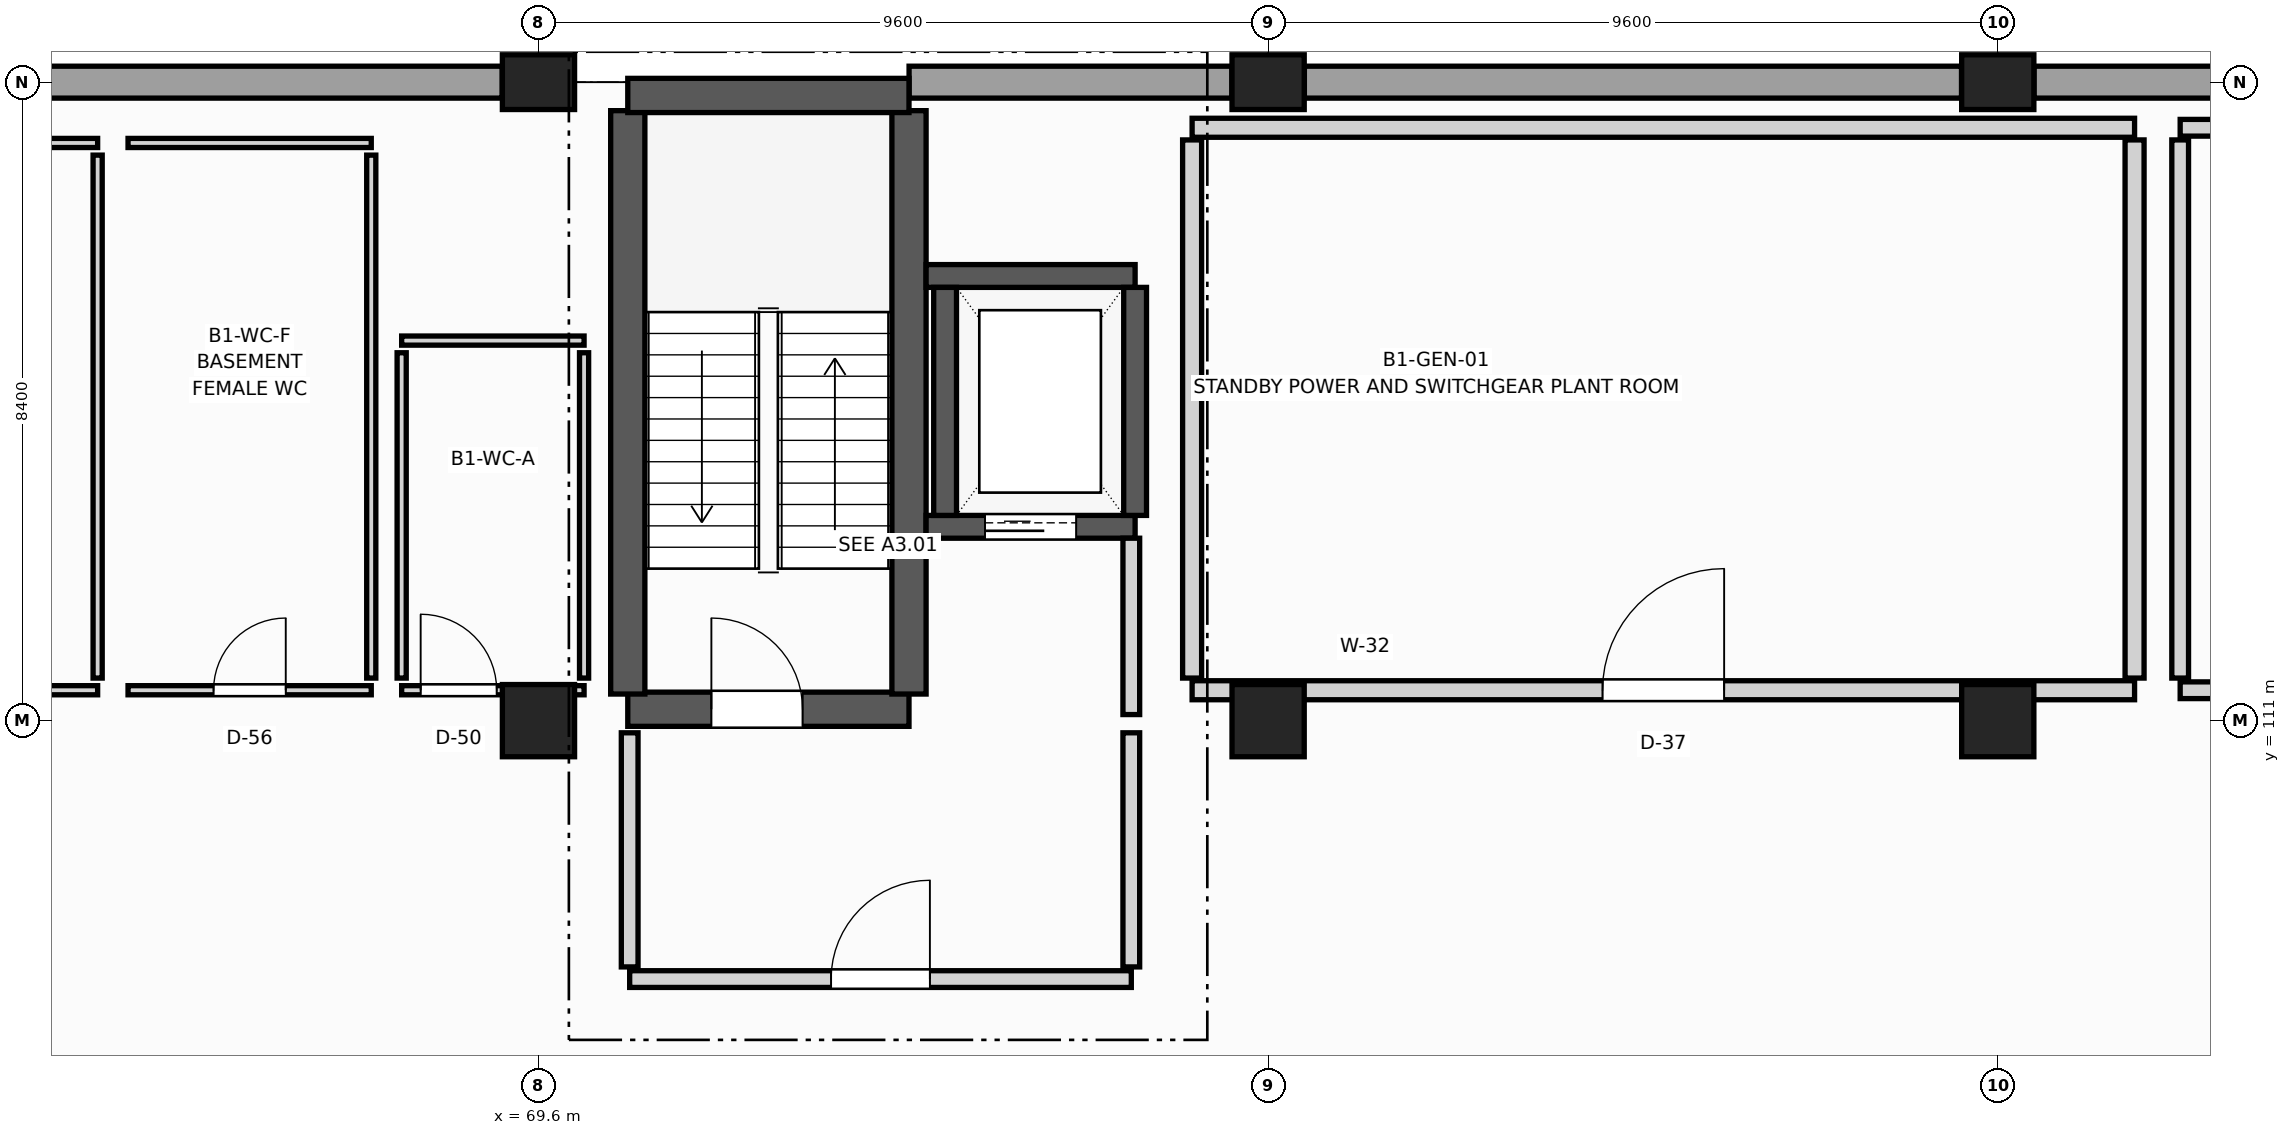
"""IFC4 building model, lengths in metres.
Left out: names, types, materials, properties, quantities, classifications, styles, units other than length and angle.
Written with IfcOpenShell. Run it as: python <this file> out.ifc"""

import sys

from ifc_helpers import new_model, si_unit, direction, frame, frame_2d, origin, origin_2d, place, context, subcontext, project, spatial, rectangle, extrude, element, fill, save


model = new_model("IFC4")
c1 = context("Model", 3, precision=1e-05, world=origin(), true_north=direction((0.0, 1.0)))
c2 = subcontext(c1, "Body", "Model", "MODEL_VIEW")
j1 = project(units=[si_unit("LENGTHUNIT", "METRE"), si_unit("PLANEANGLEUNIT", "RADIAN")], contexts=[c1])
p1 = place(None, origin())
s1 = spatial("IfcSite", under=j1, at=p1, CompositionType="ELEMENT")
p2 = place(p1, origin())
s2 = spatial("IfcBuilding", under=s1, at=p2, CompositionType="ELEMENT")
p3 = place(p2, frame((0.0, 0.0, -4.5)))
s3 = spatial("IfcBuildingStorey", under=s2, at=p3, CompositionType="ELEMENT", Elevation=-4.5)
p4 = place(p3, frame((69.6, 111.0, 0.0), z_axis=(0.0, 0.0, 1.0), x_axis=(1.0, 0.0, 0.0)))
e1 = element("IfcColumn", 1, at=p4, inside=s3, PredefinedType="COLUMN", context=c2, shape_type="SweptSolid", body=[
    extrude(rectangle(XDim=0.95, YDim=0.95, at=origin_2d()), origin(), (0.0, 0.0, 1.0), 4.14),
])
p5 = place(p3, frame((69.6, 119.4, 0.0), z_axis=(0.0, 0.0, 1.0), x_axis=(1.0, 0.0, 0.0)))
e2 = element("IfcColumn", 2, at=p5, inside=s3, PredefinedType="COLUMN", context=c2, shape_type="SweptSolid", body=[
    extrude(rectangle(XDim=0.95, YDim=0.72, at=origin_2d()), origin(), (0.0, 0.0, 1.0), 4.14),
])
p6 = place(p3, frame((79.2, 111.0, 0.0), z_axis=(0.0, 0.0, 1.0), x_axis=(1.0, 0.0, 0.0)))
e3 = element("IfcColumn", 3, at=p6, inside=s3, PredefinedType="COLUMN", context=c2, shape_type="SweptSolid", body=[
    extrude(rectangle(XDim=0.95, YDim=0.95, at=origin_2d()), origin(), (0.0, 0.0, 1.0), 4.14),
])
p7 = place(p3, frame((79.2, 119.4, 0.0), z_axis=(0.0, 0.0, 1.0), x_axis=(1.0, 0.0, 0.0)))
e4 = element("IfcColumn", 4, at=p7, inside=s3, PredefinedType="COLUMN", context=c2, shape_type="SweptSolid", body=[
    extrude(rectangle(XDim=0.95, YDim=0.72, at=origin_2d()), origin(), (0.0, 0.0, 1.0), 4.14),
])
p8 = place(p3, frame((88.8, 111.0, 0.0), z_axis=(0.0, 0.0, 1.0), x_axis=(1.0, 0.0, 0.0)))
e5 = element("IfcColumn", 5, at=p8, inside=s3, PredefinedType="COLUMN", context=c2, shape_type="SweptSolid", body=[
    extrude(rectangle(XDim=0.95, YDim=0.95, at=origin_2d()), origin(), (0.0, 0.0, 1.0), 4.14),
])
p9 = place(p3, frame((88.8, 119.4, 0.0), z_axis=(0.0, 0.0, 1.0), x_axis=(1.0, 0.0, 0.0)))
e6 = element("IfcColumn", 6, at=p9, inside=s3, PredefinedType="COLUMN", context=c2, shape_type="SweptSolid", body=[
    extrude(rectangle(XDim=0.95, YDim=0.72, at=origin_2d()), origin(), (0.0, 0.0, 1.0), 4.14),
])
p10 = place(p3, frame((60.477, 119.4, 0.0), z_axis=(0.0, 0.0, 1.0), x_axis=(1.0, 0.0, 0.0)))
e7 = element("IfcWall", 7, at=p10, inside=s3, PredefinedType="SOLIDWALL", context=c2, shape_type="SweptSolid", body=[
    extrude(rectangle(XDim=8.646, YDim=0.42, at=frame_2d((4.323, 0.0))), origin(), (0.0, 0.0, 1.0), 4.135),
])
p11 = place(p3, frame((74.476, 119.4, 0.0), z_axis=(0.0, 0.0, 1.0), x_axis=(1.0, 0.0, 0.0)))
e8 = element("IfcWall", 8, at=p11, inside=s3, PredefinedType="SOLIDWALL", context=c2, shape_type="SweptSolid", body=[
    extrude(rectangle(XDim=4.247, YDim=0.42, at=frame_2d((2.124, 0.0))), origin(), (0.0, 0.0, 1.0), 4.135),
])
for number, where, z_axis, x_axis in (
    (9, (79.677, 119.4, 0.0), (0.0, 0.0, 1.0), (1.0, 0.0, 0.0)),
    (10, (89.277, 119.4, 0.0), (0.0, 0.0, 1.0), (1.0, 0.0, 0.0)),
):
    element("IfcWall", number, at=place(p3, frame(where, z_axis=z_axis, x_axis=x_axis)), inside=s3, PredefinedType="SOLIDWALL", context=c2, shape_type="SweptSolid", body=[
        extrude(rectangle(XDim=8.646, YDim=0.42, at=frame_2d((4.323, 0.0))), origin(), (0.0, 0.0, 1.0), 4.135),
    ])
p12 = place(p3, frame((70.775, 111.15, 0.0), z_axis=(0.0, 0.0, 1.0), x_axis=(1.0, 0.0, 0.0)))
e11 = element("IfcWall", 11, at=p12, inside=s3, PredefinedType="SHEAR", context=c2, shape_type="SweptSolid", body=[
    extrude(rectangle(XDim=3.7, YDim=0.45, at=frame_2d((1.85, 0.0))), origin(), (0.0, 0.0, 1.0), 4.14),
])
p13 = place(p12, frame((1.1, 0.0, 0.0)))
e12 = element("IfcOpeningElement", 12, at=p13, cuts=e11, PredefinedType="OPENING", context=c2, shape_type="SweptSolid", body=[
    extrude(rectangle(XDim=1.2, YDim=2.2, at=frame_2d((0.6, 1.1))), frame((0.0, 0.235, 0.0), z_axis=(0.0, -1.0, 0.0), x_axis=(1.0, 0.0, 0.0)), (0.0, 0.0, 1.0), 0.47),
])
for number, where, z_axis, x_axis in (
    (13, (70.775, 111.35, 0.0), (0.0, 0.0, 1.0), (0.0, 1.0, 0.0)),
    (14, (74.475, 111.35, 0.0), (0.0, 0.0, 1.0), (0.0, 1.0, 0.0)),
):
    element("IfcWall", number, at=place(p3, frame(where, z_axis=z_axis, x_axis=x_axis)), inside=s3, PredefinedType="SHEAR", context=c2, shape_type="SweptSolid", body=[
        extrude(rectangle(XDim=7.675, YDim=0.45, at=frame_2d((3.837, 0.0))), origin(), (0.0, 0.0, 1.0), 4.14),
    ])
p14 = place(p3, frame((70.775, 119.225, 0.0), z_axis=(0.0, 0.0, 1.0), x_axis=(1.0, 0.0, 0.0)))
e15 = element("IfcWall", 15, at=p14, inside=s3, PredefinedType="SHEAR", context=c2, shape_type="SweptSolid", body=[
    extrude(rectangle(XDim=3.7, YDim=0.45, at=frame_2d((1.85, 0.0))), origin(), (0.0, 0.0, 1.0), 4.14),
])
p15 = place(p3, frame((74.7, 113.55, 0.0), z_axis=(0.0, 0.0, 1.0), x_axis=(1.0, 0.0, 0.0)))
e16 = element("IfcWall", 16, at=p15, inside=s3, PredefinedType="SHEAR", context=c2, shape_type="SweptSolid", body=[
    extrude(rectangle(XDim=2.75, YDim=0.3, at=frame_2d((1.375, 0.0))), origin(), (0.0, 0.0, 1.0), 4.14),
])
p16 = place(p15, frame((0.775, 0.0, 0.0)))
e17 = element("IfcOpeningElement", 17, at=p16, cuts=e16, PredefinedType="OPENING", context=c2, shape_type="SweptSolid", body=[
    extrude(rectangle(XDim=1.2, YDim=2.2, at=frame_2d((0.6, 1.1))), frame((0.0, 0.16, 0.0), z_axis=(0.0, -1.0, 0.0), x_axis=(1.0, 0.0, 0.0)), (0.0, 0.0, 1.0), 0.32),
])
p17 = place(p3, frame((74.7, 116.85, 0.0), z_axis=(0.0, 0.0, 1.0), x_axis=(1.0, 0.0, 0.0)))
e18 = element("IfcWall", 18, at=p17, inside=s3, PredefinedType="SHEAR", context=c2, shape_type="SweptSolid", body=[
    extrude(rectangle(XDim=2.75, YDim=0.3, at=frame_2d((1.375, 0.0))), origin(), (0.0, 0.0, 1.0), 4.14),
])
for number, where, z_axis, x_axis in (
    (19, (74.95, 113.7, 0.0), (0.0, 0.0, 1.0), (0.0, 1.0, 0.0)),
    (20, (77.45, 113.7, 0.0), (0.0, 0.0, 1.0), (0.0, 1.0, 0.0)),
):
    element("IfcWall", number, at=place(p3, frame(where, z_axis=z_axis, x_axis=x_axis)), inside=s3, PredefinedType="SHEAR", context=c2, shape_type="SweptSolid", body=[
        extrude(rectangle(XDim=3.0, YDim=0.3, at=frame_2d((1.5, 0.0))), origin(), (0.0, 0.0, 1.0), 4.14),
    ])
p18 = place(p3, frame((70.8, 107.6, 0.0), z_axis=(0.0, 0.0, 1.0), x_axis=(1.0, 0.0, 0.0)))
e21 = element("IfcWall", 21, at=p18, inside=s3, PredefinedType="PARTITIONING", context=c2, shape_type="SweptSolid", body=[
    extrude(rectangle(XDim=6.6, YDim=0.22, at=frame_2d((3.3, 0.0))), origin(), (0.0, 0.0, 1.0), 3.22),
])
p19 = place(p18, frame((2.65, 0.0, 0.0)))
e22 = element("IfcOpeningElement", 22, at=p19, cuts=e21, PredefinedType="OPENING", context=c2, shape_type="SweptSolid", body=[
    extrude(rectangle(XDim=1.3, YDim=2.2, at=frame_2d((0.65, 1.1))), frame((0.0, 0.12, 0.0), z_axis=(0.0, -1.0, 0.0), x_axis=(1.0, 0.0, 0.0)), (0.0, 0.0, 1.0), 0.24),
])
p20 = place(p3, frame((77.4, 111.08, 0.0), z_axis=(0.0, 0.0, 1.0), x_axis=(0.0, 1.0, 0.0)))
e23 = element("IfcWall", 23, at=p20, inside=s3, PredefinedType="PARTITIONING", context=c2, shape_type="SweptSolid", body=[
    extrude(rectangle(XDim=2.32, YDim=0.22, at=frame_2d((1.16, 0.0))), origin(), (0.0, 0.0, 1.0), 3.22),
])
for number, where, z_axis, x_axis in (
    (24, (70.8, 107.76, 0.0), (0.0, 0.0, 1.0), (0.0, 1.0, 0.0)),
    (25, (77.4, 107.76, 0.0), (0.0, 0.0, 1.0), (0.0, 1.0, 0.0)),
):
    element("IfcWall", number, at=place(p3, frame(where, z_axis=z_axis, x_axis=x_axis)), inside=s3, PredefinedType="PARTITIONING", context=c2, shape_type="SweptSolid", body=[
        extrude(rectangle(XDim=3.08, YDim=0.22, at=frame_2d((1.54, 0.0))), origin(), (0.0, 0.0, 1.0), 3.22),
    ])
p21 = place(p3, frame((78.2, 111.4, 0.0), z_axis=(0.0, 0.0, 1.0), x_axis=(1.0, 0.0, 0.0)))
e26 = element("IfcWall", 26, at=p21, inside=s3, PredefinedType="PARTITIONING", context=c2, shape_type="SweptSolid", body=[
    extrude(rectangle(XDim=12.4, YDim=0.25, at=frame_2d((6.2, 0.0))), origin(), (0.0, 0.0, 1.0), 3.22),
])
p22 = place(p21, frame((5.4, 0.0, 0.0)))
e27 = element("IfcOpeningElement", 27, at=p22, cuts=e26, PredefinedType="OPENING", context=c2, shape_type="SweptSolid", body=[
    extrude(rectangle(XDim=1.6, YDim=2.3, at=frame_2d((0.8, 1.15))), frame((0.0, 0.135, 0.0), z_axis=(0.0, -1.0, 0.0), x_axis=(1.0, 0.0, 0.0)), (0.0, 0.0, 1.0), 0.27),
])
p23 = place(p3, frame((78.2, 118.8, 0.0), z_axis=(0.0, 0.0, 1.0), x_axis=(1.0, 0.0, 0.0)))
e28 = element("IfcWall", 28, at=p23, inside=s3, PredefinedType="PARTITIONING", context=c2, shape_type="SweptSolid", body=[
    extrude(rectangle(XDim=12.4, YDim=0.25, at=frame_2d((6.2, 0.0))), origin(), (0.0, 0.0, 1.0), 3.22),
])
for number, where, z_axis, x_axis in (
    (29, (78.2, 111.56, 0.0), (0.0, 0.0, 1.0), (0.0, 1.0, 0.0)),
    (30, (90.6, 111.56, 0.0), (0.0, 0.0, 1.0), (0.0, 1.0, 0.0)),
):
    element("IfcWall", number, at=place(p3, frame(where, z_axis=z_axis, x_axis=x_axis)), inside=s3, PredefinedType="PARTITIONING", context=c2, shape_type="SweptSolid", body=[
        extrude(rectangle(XDim=7.08, YDim=0.25, at=frame_2d((3.54, 0.0))), origin(), (0.0, 0.0, 1.0), 3.22),
    ])
p24 = place(p3, frame((91.2, 111.4, 0.0), z_axis=(0.0, 0.0, 1.0), x_axis=(1.0, 0.0, 0.0)))
e31 = element("IfcWall", 31, at=p24, inside=s3, PredefinedType="PARTITIONING", context=c2, shape_type="SweptSolid", body=[
    extrude(rectangle(XDim=8.4, YDim=0.22, at=frame_2d((4.2, 0.0))), origin(), (0.0, 0.0, 1.0), 3.22),
])
p25 = place(p24, frame((3.4, 0.0, 0.0)))
e32 = element("IfcOpeningElement", 32, at=p25, cuts=e31, PredefinedType="OPENING", context=c2, shape_type="SweptSolid", body=[
    extrude(rectangle(XDim=1.6, YDim=2.3, at=frame_2d((0.8, 1.15))), frame((0.0, 0.12, 0.0), z_axis=(0.0, -1.0, 0.0), x_axis=(1.0, 0.0, 0.0)), (0.0, 0.0, 1.0), 0.24),
])
p26 = place(p3, frame((91.2, 118.8, 0.0), z_axis=(0.0, 0.0, 1.0), x_axis=(1.0, 0.0, 0.0)))
e33 = element("IfcWall", 33, at=p26, inside=s3, PredefinedType="PARTITIONING", context=c2, shape_type="SweptSolid", body=[
    extrude(rectangle(XDim=8.4, YDim=0.22, at=frame_2d((4.2, 0.0))), origin(), (0.0, 0.0, 1.0), 3.22),
])
p27 = place(p3, frame((91.2, 111.56, 0.0), z_axis=(0.0, 0.0, 1.0), x_axis=(0.0, 1.0, 0.0)))
e34 = element("IfcWall", 34, at=p27, inside=s3, PredefinedType="PARTITIONING", context=c2, shape_type="SweptSolid", body=[
    extrude(rectangle(XDim=7.08, YDim=0.22, at=frame_2d((3.54, 0.0))), origin(), (0.0, 0.0, 1.0), 3.22),
])
p28 = place(p3, frame((60.4, 111.4, 0.0), z_axis=(0.0, 0.0, 1.0), x_axis=(1.0, 0.0, 0.0)))
e35 = element("IfcWall", 35, at=p28, inside=s3, PredefinedType="PARTITIONING", context=c2, shape_type="SweptSolid", body=[
    extrude(rectangle(XDim=3.4, YDim=0.12, at=frame_2d((1.7, 0.0))), origin(), (0.0, 0.0, 1.0), 3.22),
])
p29 = place(p28, frame((1.225, 0.0, 0.0)))
e36 = element("IfcOpeningElement", 36, at=p29, cuts=e35, PredefinedType="OPENING", context=c2, shape_type="SweptSolid", body=[
    extrude(rectangle(XDim=0.95, YDim=2.1, at=frame_2d((0.475, 1.05))), frame((0.0, 0.07, 0.0), z_axis=(0.0, -1.0, 0.0), x_axis=(1.0, 0.0, 0.0)), (0.0, 0.0, 1.0), 0.14),
])
p30 = place(p3, frame((60.4, 118.6, 0.0), z_axis=(0.0, 0.0, 1.0), x_axis=(1.0, 0.0, 0.0)))
e37 = element("IfcWall", 37, at=p30, inside=s3, PredefinedType="PARTITIONING", context=c2, shape_type="SweptSolid", body=[
    extrude(rectangle(XDim=3.4, YDim=0.12, at=frame_2d((1.7, 0.0))), origin(), (0.0, 0.0, 1.0), 3.22),
])
p31 = place(p3, frame((63.8, 111.56, 0.0), z_axis=(0.0, 0.0, 1.0), x_axis=(0.0, 1.0, 0.0)))
e38 = element("IfcWall", 38, at=p31, inside=s3, PredefinedType="PARTITIONING", context=c2, shape_type="SweptSolid", body=[
    extrude(rectangle(XDim=6.88, YDim=0.12, at=frame_2d((3.44, 0.0))), origin(), (0.0, 0.0, 1.0), 3.22),
])
p32 = place(p3, frame((64.2, 111.4, 0.0), z_axis=(0.0, 0.0, 1.0), x_axis=(1.0, 0.0, 0.0)))
e39 = element("IfcWall", 39, at=p32, inside=s3, PredefinedType="PARTITIONING", context=c2, shape_type="SweptSolid", body=[
    extrude(rectangle(XDim=3.2, YDim=0.12, at=frame_2d((1.6, 0.0))), origin(), (0.0, 0.0, 1.0), 3.22),
])
p33 = place(p32, frame((1.125, 0.0, 0.0)))
e40 = element("IfcOpeningElement", 40, at=p33, cuts=e39, PredefinedType="OPENING", context=c2, shape_type="SweptSolid", body=[
    extrude(rectangle(XDim=0.95, YDim=2.1, at=frame_2d((0.475, 1.05))), frame((0.0, 0.07, 0.0), z_axis=(0.0, -1.0, 0.0), x_axis=(1.0, 0.0, 0.0)), (0.0, 0.0, 1.0), 0.14),
])
p34 = place(p3, frame((64.2, 118.6, 0.0), z_axis=(0.0, 0.0, 1.0), x_axis=(1.0, 0.0, 0.0)))
e41 = element("IfcWall", 41, at=p34, inside=s3, PredefinedType="PARTITIONING", context=c2, shape_type="SweptSolid", body=[
    extrude(rectangle(XDim=3.2, YDim=0.12, at=frame_2d((1.6, 0.0))), origin(), (0.0, 0.0, 1.0), 3.22),
])
p35 = place(p3, frame((67.4, 111.56, 0.0), z_axis=(0.0, 0.0, 1.0), x_axis=(0.0, 1.0, 0.0)))
e42 = element("IfcWall", 42, at=p35, inside=s3, PredefinedType="PARTITIONING", context=c2, shape_type="SweptSolid", body=[
    extrude(rectangle(XDim=6.88, YDim=0.12, at=frame_2d((3.44, 0.0))), origin(), (0.0, 0.0, 1.0), 3.22),
])
p36 = place(p3, frame((67.8, 111.4, 0.0), z_axis=(0.0, 0.0, 1.0), x_axis=(1.0, 0.0, 0.0)))
e43 = element("IfcWall", 43, at=p36, inside=s3, PredefinedType="PARTITIONING", context=c2, shape_type="SweptSolid", body=[
    extrude(rectangle(XDim=2.4, YDim=0.12, at=frame_2d((1.2, 0.0))), origin(), (0.0, 0.0, 1.0), 3.22),
])
p37 = place(p36, frame((0.25, 0.0, 0.0)))
e44 = element("IfcOpeningElement", 44, at=p37, cuts=e43, PredefinedType="OPENING", context=c2, shape_type="SweptSolid", body=[
    extrude(rectangle(XDim=1.0, YDim=2.15, at=frame_2d((0.5, 1.075))), frame((0.0, 0.07, 0.0), z_axis=(0.0, -1.0, 0.0), x_axis=(1.0, 0.0, 0.0)), (0.0, 0.0, 1.0), 0.14),
])
p38 = place(p3, frame((67.8, 116.0, 0.0), z_axis=(0.0, 0.0, 1.0), x_axis=(1.0, 0.0, 0.0)))
e45 = element("IfcWall", 45, at=p38, inside=s3, PredefinedType="PARTITIONING", context=c2, shape_type="SweptSolid", body=[
    extrude(rectangle(XDim=2.4, YDim=0.12, at=frame_2d((1.2, 0.0))), origin(), (0.0, 0.0, 1.0), 3.22),
])
for number, where, z_axis, x_axis in (
    (46, (67.8, 111.56, 0.0), (0.0, 0.0, 1.0), (0.0, 1.0, 0.0)),
    (47, (70.2, 111.56, 0.0), (0.0, 0.0, 1.0), (0.0, 1.0, 0.0)),
):
    element("IfcWall", number, at=place(p3, frame(where, z_axis=z_axis, x_axis=x_axis)), inside=s3, PredefinedType="PARTITIONING", context=c2, shape_type="SweptSolid", body=[
        extrude(rectangle(XDim=4.28, YDim=0.12, at=frame_2d((2.14, 0.0))), origin(), (0.0, 0.0, 1.0), 3.22),
    ])
p39 = place(p13, origin())
e48 = element("IfcDoor", 48, at=p39, inside=s3, OperationType="SINGLE_SWING_LEFT", PredefinedType="DOOR", context=c2, shape_type="SweptSolid", body=[
    extrude(rectangle(XDim=1.2, YDim=2.2, at=frame_2d((0.6, 1.1))), frame((0.0, 0.025, 0.0), z_axis=(0.0, -1.0, 0.0), x_axis=(1.0, 0.0, 0.0)), (0.0, 0.0, 1.0), 0.05),
])
fill(e12, e48)
p40 = place(p16, origin())
e49 = element("IfcDoor", 49, at=p40, inside=s3, OperationType="SLIDING_TO_LEFT", PredefinedType="DOOR", context=c2, shape_type="SweptSolid", body=[
    extrude(rectangle(XDim=1.2, YDim=2.2, at=frame_2d((0.6, 1.1))), frame((0.0, 0.025, 0.0), z_axis=(0.0, -1.0, 0.0), x_axis=(1.0, 0.0, 0.0)), (0.0, 0.0, 1.0), 0.05),
])
fill(e17, e49)
p41 = place(p19, origin())
e50 = element("IfcDoor", 50, at=p41, inside=s3, OperationType="SINGLE_SWING_RIGHT", PredefinedType="DOOR", context=c2, shape_type="SweptSolid", body=[
    extrude(rectangle(XDim=1.3, YDim=2.2, at=frame_2d((0.65, 1.1))), frame((0.0, 0.025, 0.0), z_axis=(0.0, -1.0, 0.0), x_axis=(1.0, 0.0, 0.0)), (0.0, 0.0, 1.0), 0.05),
])
fill(e22, e50)
p42 = place(p22, origin())
e51 = element("IfcDoor", 51, at=p42, inside=s3, OperationType="SINGLE_SWING_RIGHT", PredefinedType="DOOR", context=c2, shape_type="SweptSolid", body=[
    extrude(rectangle(XDim=1.6, YDim=2.3, at=frame_2d((0.8, 1.15))), frame((0.0, 0.025, 0.0), z_axis=(0.0, -1.0, 0.0), x_axis=(1.0, 0.0, 0.0)), (0.0, 0.0, 1.0), 0.05),
])
fill(e27, e51)
p43 = place(p33, origin())
e52 = element("IfcDoor", 52, at=p43, inside=s3, OperationType="SINGLE_SWING_RIGHT", PredefinedType="DOOR", context=c2, shape_type="SweptSolid", body=[
    extrude(rectangle(XDim=0.95, YDim=2.1, at=frame_2d((0.475, 1.05))), frame((0.0, 0.025, 0.0), z_axis=(0.0, -1.0, 0.0), x_axis=(1.0, 0.0, 0.0)), (0.0, 0.0, 1.0), 0.05),
])
fill(e40, e52)
p44 = place(p37, origin())
e53 = element("IfcDoor", 53, at=p44, inside=s3, OperationType="SINGLE_SWING_LEFT", PredefinedType="DOOR", context=c2, shape_type="SweptSolid", body=[
    extrude(rectangle(XDim=1.0, YDim=2.15, at=frame_2d((0.5, 1.075))), frame((0.0, 0.025, 0.0), z_axis=(0.0, -1.0, 0.0), x_axis=(1.0, 0.0, 0.0)), (0.0, 0.0, 1.0), 0.05),
])
fill(e44, e53)
save(model, sys.argv[1])
